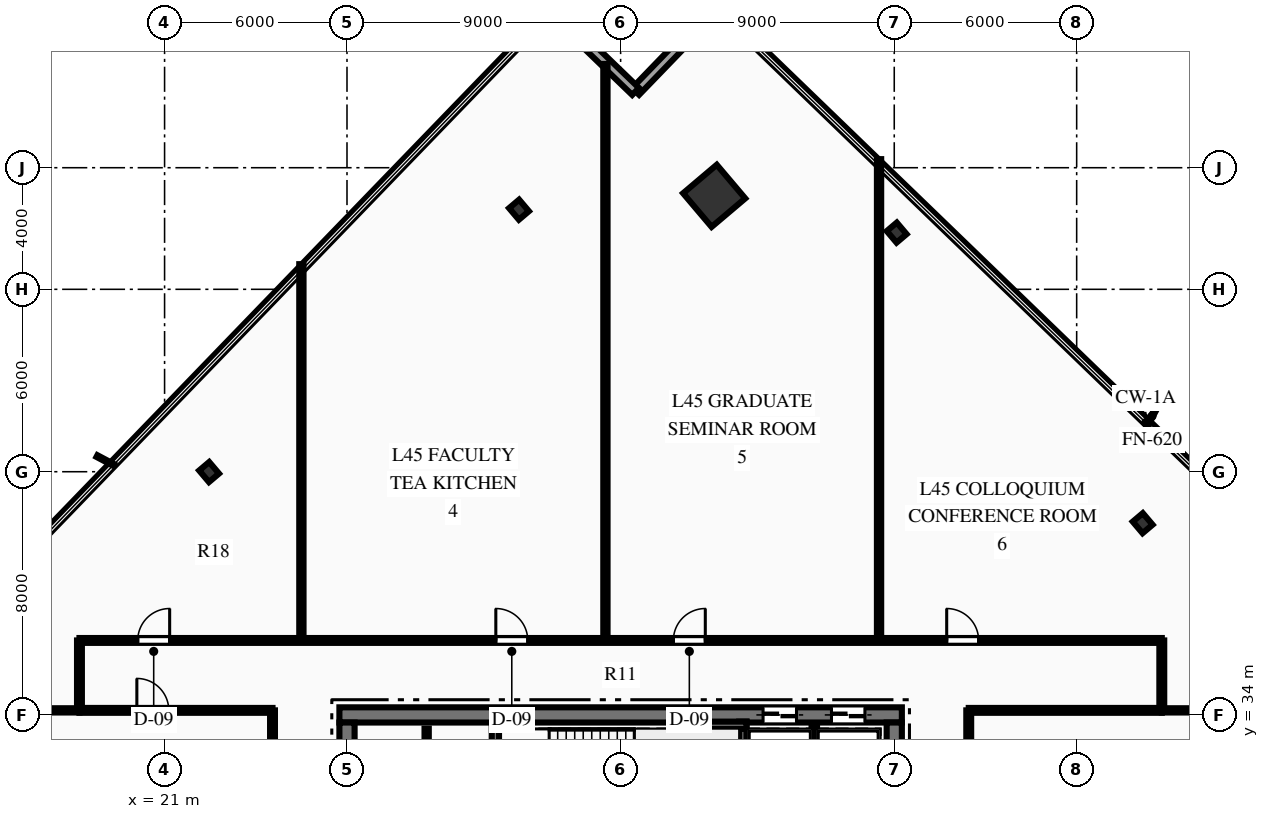
"""IFC4 building model, lengths in metres.
Left out: names, types, materials, properties, quantities, classifications, styles, units other than length and angle.
Written with IfcOpenShell. Run it as: python <this file> out.ifc"""

import sys

from ifc_helpers import new_model, si_unit, direction, frame, frame_2d, origin, origin_2d, place, context, subcontext, project, spatial, rectangle, hollow_rectangle, i_section, extrude, element, fill, save


model = new_model("IFC4")
c1 = context("Model", 3, precision=1e-05, world=origin(), true_north=direction((0.0, 1.0)))
c2 = subcontext(c1, "Body", "Model", "MODEL_VIEW")
j1 = project(units=[si_unit("LENGTHUNIT", "METRE"), si_unit("PLANEANGLEUNIT", "RADIAN")], contexts=[c1])
p1 = place(None, origin())
s1 = spatial("IfcSite", under=j1, at=p1, CompositionType="ELEMENT")
p2 = place(p1, origin())
s2 = spatial("IfcBuilding", under=s1, at=p2, CompositionType="ELEMENT")
p3 = place(p2, frame((0.0, 0.0, 181.95)))
s3 = spatial("IfcBuildingStorey", under=s2, at=p3, CompositionType="ELEMENT", Elevation=181.95)
p4 = place(p3, frame((26.75, 34.0, 0.0), z_axis=(0.0, 0.0, 1.0), x_axis=(1.0, 0.0, 0.0)))
e1 = element("IfcWall", 1, at=p4, inside=s3, PredefinedType="SHEAR", context=c2, shape_type="SweptSolid", body=[
    extrude(rectangle(XDim=18.5, YDim=0.5, at=frame_2d((9.25, 0.0))), origin(), (0.0, 0.0, 1.0), 3.75),
])
p5 = place(p4, frame((13.935, 0.0, 0.0)))
e2 = element("IfcOpeningElement", 2, at=p5, cuts=e1, PredefinedType="OPENING", context=c2, shape_type="SweptSolid", body=[
    extrude(rectangle(XDim=1.1, YDim=2.15, at=frame_2d((0.55, 1.075))), frame((0.0, 0.26, 0.0), z_axis=(0.0, -1.0, 0.0), x_axis=(1.0, 0.0, 0.0)), (0.0, 0.0, 1.0), 0.52),
])
p6 = place(p4, frame((16.185, 0.0, 0.0)))
e3 = element("IfcOpeningElement", 3, at=p6, cuts=e1, PredefinedType="OPENING", context=c2, shape_type="SweptSolid", body=[
    extrude(rectangle(XDim=1.1, YDim=2.15, at=frame_2d((0.55, 1.075))), frame((0.0, 0.26, 0.0), z_axis=(0.0, -1.0, 0.0), x_axis=(1.0, 0.0, 0.0)), (0.0, 0.0, 1.0), 0.52),
])
p7 = place(p3, frame((27.0, 18.25, 0.0), z_axis=(0.0, 0.0, 1.0), x_axis=(0.0, 1.0, 0.0)))
e4 = element("IfcWall", 4, at=p7, inside=s3, PredefinedType="SHEAR", context=c2, shape_type="SweptSolid", body=[
    extrude(rectangle(XDim=15.5, YDim=0.5, at=frame_2d((7.75, 0.0))), origin(), (0.0, 0.0, 1.0), 3.75),
])
p8 = place(p7, frame((9.99, 0.0, 0.0)))
e5 = element("IfcOpeningElement", 5, at=p8, cuts=e4, PredefinedType="OPENING", context=c2, shape_type="SweptSolid", body=[
    extrude(rectangle(XDim=1.4, YDim=2.2, at=frame_2d((0.7, 1.1))), frame((0.0, 0.26, 0.0), z_axis=(0.0, -1.0, 0.0), x_axis=(1.0, 0.0, 0.0)), (0.0, 0.0, 1.0), 0.52),
])
p9 = place(p3, frame((45.0, 18.25, 0.0), z_axis=(0.0, 0.0, 1.0), x_axis=(0.0, 1.0, 0.0)))
e6 = element("IfcWall", 6, at=p9, inside=s3, PredefinedType="SHEAR", context=c2, shape_type="SweptSolid", body=[
    extrude(rectangle(XDim=15.5, YDim=0.5, at=frame_2d((7.75, 0.0))), origin(), (0.0, 0.0, 1.0), 3.75),
])
p10 = place(p9, frame((9.99, 0.0, 0.0)))
e7 = element("IfcOpeningElement", 7, at=p10, cuts=e6, PredefinedType="OPENING", context=c2, shape_type="SweptSolid", body=[
    extrude(rectangle(XDim=1.4, YDim=2.2, at=frame_2d((0.7, 1.1))), frame((0.0, 0.26, 0.0), z_axis=(0.0, -1.0, 0.0), x_axis=(1.0, 0.0, 0.0)), (0.0, 0.0, 1.0), 0.52),
])
p11 = place(p3, frame((31.88, 29.93, 0.0), z_axis=(0.0, 0.0, 1.0), x_axis=(0.0, 1.0, 0.0)))
e8 = element("IfcWall", 8, at=p11, inside=s3, PredefinedType="SHEAR", context=c2, shape_type="SweptSolid", body=[
    extrude(rectangle(XDim=3.79, YDim=0.24, at=frame_2d((1.895, 0.0))), origin(), (0.0, 0.0, 1.0), 3.75),
])
p12 = place(p3, frame((40.02, 29.93, 0.0), z_axis=(0.0, 0.0, 1.0), x_axis=(0.0, 1.0, 0.0)))
e9 = element("IfcWall", 9, at=p12, inside=s3, PredefinedType="SHEAR", context=c2, shape_type="SweptSolid", body=[
    extrude(rectangle(XDim=3.85, YDim=0.24, at=frame_2d((1.925, 0.0))), origin(), (0.0, 0.0, 1.0), 3.75),
])
p13 = place(p3, frame((37.85, 33.66, 0.0), z_axis=(0.0, 0.0, 1.0), x_axis=(1.0, 0.0, 0.0)))
e10 = element("IfcWall", 10, at=p13, inside=s3, PredefinedType="SHEAR", context=c2, shape_type="SweptSolid", body=[
    extrude(rectangle(XDim=2.29, YDim=0.24, at=frame_2d((1.145, 0.0))), origin(), (0.0, 0.0, 1.0), 3.75),
])
p14 = place(p3, frame((39.077, 51.075, 0.0), z_axis=(0.0, 0.0, 1.0), x_axis=(0.763232469783, 0.646123979643, 0.0)))
e11 = element("IfcColumn", 11, at=p14, inside=s3, PredefinedType="COLUMN", context=c2, shape_type="SweptSolid", body=[
    extrude(hollow_rectangle(XDim=1.45, YDim=1.45, WallThickness=0.07, at=origin_2d()), origin(), (0.0, 0.0, 1.0), 3.75),
])
for number, where, z_axis, x_axis in (
    (12, (53.171, 40.307, 0.0), (0.0, 0.0, 1.0), (0.763, 0.646, 0.0)),
    (13, (45.08, 49.865, 0.0), (0.0, 0.0, 1.0), (0.763, 0.646, 0.0)),
    (14, (32.657, 50.619, 0.0), (0.0, 0.0, 1.0), (0.763, 0.646, 0.0)),
    (15, (22.464, 41.99, 0.0), (0.0, 0.0, 1.0), (0.763, 0.646, 0.0)),
):
    element("IfcColumn", number, at=place(p3, frame(where, z_axis=z_axis, x_axis=x_axis)), inside=s3, PredefinedType="COLUMN", context=c2, shape_type="SweptSolid", body=[
        extrude(i_section(OverallWidth=0.432, OverallDepth=0.498, WebThickness=0.056, FlangeThickness=0.089, at=origin_2d()), origin(), (0.0, 0.0, 1.0), 3.75),
    ])
p15 = place(p3, frame((36.492, 54.509, 0.0), z_axis=(0.0, 0.0, 1.0), x_axis=(0.694639171191, 0.719358340361, 0.0)))
e16 = element("IfcWall", 16, at=p15, inside=s3, PredefinedType="STANDARD", context=c2, shape_type="SweptSolid", body=[
    extrude(rectangle(XDim=4.0, YDim=0.32, at=frame_2d((2.0, 0.0))), origin(), (0.0, 0.0, 1.0), 3.46),
])
p16 = place(p3, frame((33.615, 57.288, 0.0), z_axis=(0.0, 0.0, 1.0), x_axis=(0.719327842116, -0.694670753348, 0.0)))
e17 = element("IfcWall", 17, at=p16, inside=s3, PredefinedType="STANDARD", context=c2, shape_type="SweptSolid", body=[
    extrude(rectangle(XDim=4.0, YDim=0.32, at=frame_2d((2.0, 0.0))), origin(), (0.0, 0.0, 1.0), 3.46),
])
p17 = place(p3, frame((29.62, 29.95, 0.0), z_axis=(0.0, 0.0, 1.0), x_axis=(0.0, 1.0, 0.0)))
e18 = element("IfcWall", 18, at=p17, inside=s3, PredefinedType="PARTITIONING", context=c2, shape_type="SweptSolid", body=[
    extrude(rectangle(XDim=3.6, YDim=0.14, at=frame_2d((1.8, 0.0))), origin(), (0.0, 0.0, 1.0), 3.46),
])
p18 = place(p3, frame((42.37, 29.9, 0.0), z_axis=(0.0, 0.0, 1.0), x_axis=(0.0, 1.0, 0.0)))
e19 = element("IfcWall", 19, at=p18, inside=s3, PredefinedType="PARTITIONING", context=c2, shape_type="SweptSolid", body=[
    extrude(rectangle(XDim=3.75, YDim=0.18, at=frame_2d((1.875, 0.0))), origin(), (0.0, 0.0, 1.0), 3.46),
])
p19 = place(p3, frame((18.2, 36.45, 0.0), z_axis=(0.0, 0.0, 1.0), x_axis=(1.0, 0.0, 0.0)))
e20 = element("IfcWall", 20, at=p19, inside=s3, PredefinedType="PARTITIONING", context=c2, shape_type="SweptSolid", body=[
    extrude(rectangle(XDim=35.6, YDim=0.16, at=frame_2d((17.8, 0.0))), origin(), (0.0, 0.0, 1.0), 3.46),
])
p20 = place(p19, frame((1.917, 0.0, 0.0)))
e21 = element("IfcOpeningElement", 21, at=p20, cuts=e20, PredefinedType="OPENING", context=c2, shape_type="SweptSolid", body=[
    extrude(rectangle(XDim=1.05, YDim=2.15, at=frame_2d((0.525, 1.075))), frame((0.0, 0.09, 0.0), z_axis=(0.0, -1.0, 0.0), x_axis=(1.0, 0.0, 0.0)), (0.0, 0.0, 1.0), 0.18),
])
p21 = place(p19, frame((13.695, 0.0, 0.0)))
e22 = element("IfcOpeningElement", 22, at=p21, cuts=e20, PredefinedType="OPENING", context=c2, shape_type="SweptSolid", body=[
    extrude(rectangle(XDim=1.05, YDim=2.15, at=frame_2d((0.525, 1.075))), frame((0.0, 0.09, 0.0), z_axis=(0.0, -1.0, 0.0), x_axis=(1.0, 0.0, 0.0)), (0.0, 0.0, 1.0), 0.18),
])
p22 = place(p19, frame((19.535, 0.0, 0.0)))
e23 = element("IfcOpeningElement", 23, at=p22, cuts=e20, PredefinedType="OPENING", context=c2, shape_type="SweptSolid", body=[
    extrude(rectangle(XDim=1.05, YDim=2.15, at=frame_2d((0.525, 1.075))), frame((0.0, 0.09, 0.0), z_axis=(0.0, -1.0, 0.0), x_axis=(1.0, 0.0, 0.0)), (0.0, 0.0, 1.0), 0.18),
])
p23 = place(p19, frame((28.525, 0.0, 0.0)))
e24 = element("IfcOpeningElement", 24, at=p23, cuts=e20, PredefinedType="OPENING", context=c2, shape_type="SweptSolid", body=[
    extrude(rectangle(XDim=1.05, YDim=2.15, at=frame_2d((0.525, 1.075))), frame((0.0, 0.09, 0.0), z_axis=(0.0, -1.0, 0.0), x_axis=(1.0, 0.0, 0.0)), (0.0, 0.0, 1.0), 0.18),
])
p24 = place(p3, frame((18.2, 34.15, 0.0), z_axis=(0.0, 0.0, 1.0), x_axis=(1.0, 0.0, 0.0)))
e25 = element("IfcWall", 25, at=p24, inside=s3, PredefinedType="PARTITIONING", context=c2, shape_type="SweptSolid", body=[
    extrude(rectangle(XDim=6.35, YDim=0.16, at=frame_2d((3.175, 0.0))), origin(), (0.0, 0.0, 1.0), 3.46),
])
p25 = place(p24, frame((1.888, 0.0, 0.0)))
e26 = element("IfcOpeningElement", 26, at=p25, cuts=e25, PredefinedType="OPENING", context=c2, shape_type="SweptSolid", body=[
    extrude(rectangle(XDim=1.05, YDim=2.15, at=frame_2d((0.525, 1.075))), frame((0.0, 0.09, 0.0), z_axis=(0.0, -1.0, 0.0), x_axis=(1.0, 0.0, 0.0)), (0.0, 0.0, 1.0), 0.18),
])
p26 = place(p3, frame((47.45, 34.15, 0.0), z_axis=(0.0, 0.0, 1.0), x_axis=(1.0, 0.0, 0.0)))
e27 = element("IfcWall", 27, at=p26, inside=s3, PredefinedType="PARTITIONING", context=c2, shape_type="SweptSolid", body=[
    extrude(rectangle(XDim=6.35, YDim=0.16, at=frame_2d((3.175, 0.0))), origin(), (0.0, 0.0, 1.0), 3.46),
])
p27 = place(p3, frame((24.55, 17.85, 0.0), z_axis=(0.0, 0.0, 1.0), x_axis=(0.0, 1.0, 0.0)))
e28 = element("IfcWall", 28, at=p27, inside=s3, PredefinedType="PARTITIONING", context=c2, shape_type="SweptSolid", body=[
    extrude(rectangle(XDim=16.3, YDim=0.16, at=frame_2d((8.15, 0.0))), origin(), (0.0, 0.0, 1.0), 3.46),
])
p28 = place(p27, frame((5.741, 0.0, 0.0)))
e29 = element("IfcOpeningElement", 29, at=p28, cuts=e28, PredefinedType="OPENING", context=c2, shape_type="SweptSolid", body=[
    extrude(rectangle(XDim=1.05, YDim=2.15, at=frame_2d((0.525, 1.075))), frame((0.0, 0.09, 0.0), z_axis=(0.0, -1.0, 0.0), x_axis=(1.0, 0.0, 0.0)), (0.0, 0.0, 1.0), 0.18),
])
p29 = place(p27, frame((8.605, 0.0, 0.0)))
e30 = element("IfcOpeningElement", 30, at=p29, cuts=e28, PredefinedType="OPENING", context=c2, shape_type="SweptSolid", body=[
    extrude(rectangle(XDim=1.05, YDim=2.15, at=frame_2d((0.525, 1.075))), frame((0.0, 0.09, 0.0), z_axis=(0.0, -1.0, 0.0), x_axis=(1.0, 0.0, 0.0)), (0.0, 0.0, 1.0), 0.18),
])
p30 = place(p3, frame((47.45, 27.25, 0.0), z_axis=(0.0, 0.0, 1.0), x_axis=(0.0, 1.0, 0.0)))
e31 = element("IfcWall", 31, at=p30, inside=s3, PredefinedType="PARTITIONING", context=c2, shape_type="SweptSolid", body=[
    extrude(rectangle(XDim=6.9, YDim=0.16, at=frame_2d((3.45, 0.0))), origin(), (0.0, 0.0, 1.0), 3.46),
])
for number, where, z_axis, x_axis in (
    (32, (18.2, 34.15, 0.0), (0.0, 0.0, 1.0), (0.0, 1.0, 0.0)),
    (33, (53.8, 34.15, 0.0), (0.0, 0.0, 1.0), (0.0, 1.0, 0.0)),
):
    element("IfcWall", number, at=place(p3, frame(where, z_axis=z_axis, x_axis=x_axis)), inside=s3, PredefinedType="PARTITIONING", context=c2, shape_type="SweptSolid", body=[
        extrude(rectangle(XDim=2.3, YDim=0.16, at=frame_2d((1.15, 0.0))), origin(), (0.0, 0.0, 1.0), 3.46),
    ])
p31 = place(p3, frame((11.327, 34.15, 0.0), z_axis=(0.0, 0.0, 1.0), x_axis=(1.0, 0.0, 0.0)))
e34 = element("IfcWall", 34, at=p31, inside=s3, PredefinedType="PARTITIONING", context=c2, shape_type="SweptSolid", body=[
    extrude(rectangle(XDim=6.873, YDim=0.14, at=frame_2d((3.437, 0.0))), origin(), (0.0, 0.0, 1.0), 3.46),
])
p32 = place(p3, frame((53.8, 34.15, 0.0), z_axis=(0.0, 0.0, 1.0), x_axis=(1.0, 0.0, 0.0)))
e35 = element("IfcWall", 35, at=p32, inside=s3, PredefinedType="PARTITIONING", context=c2, shape_type="SweptSolid", body=[
    extrude(rectangle(XDim=9.476, YDim=0.14, at=frame_2d((4.738, 0.0))), origin(), (0.0, 0.0, 1.0), 3.46),
])
p33 = place(p3, frame((25.5, 36.45, 0.0), z_axis=(0.0, 0.0, 1.0), x_axis=(0.0, 1.0, 0.0)))
e36 = element("IfcWall", 36, at=p33, inside=s3, PredefinedType="PARTITIONING", context=c2, shape_type="SweptSolid", body=[
    extrude(rectangle(XDim=12.377, YDim=0.14, at=frame_2d((6.188, 0.0))), origin(), (0.0, 0.0, 1.0), 3.46),
])
p34 = place(p3, frame((35.5, 36.45, 0.0), z_axis=(0.0, 0.0, 1.0), x_axis=(0.0, 1.0, 0.0)))
e37 = element("IfcWall", 37, at=p34, inside=s3, PredefinedType="PARTITIONING", context=c2, shape_type="SweptSolid", body=[
    extrude(rectangle(XDim=18.962, YDim=0.14, at=frame_2d((9.481, 0.0))), origin(), (0.0, 0.0, 1.0), 3.46),
])
p35 = place(p3, frame((44.5, 36.45, 0.0), z_axis=(0.0, 0.0, 1.0), x_axis=(0.0, 1.0, 0.0)))
e38 = element("IfcWall", 38, at=p35, inside=s3, PredefinedType="PARTITIONING", context=c2, shape_type="SweptSolid", body=[
    extrude(rectangle(XDim=15.832, YDim=0.14, at=frame_2d((7.916, 0.0))), origin(), (0.0, 0.0, 1.0), 3.46),
])
p36 = place(p20, origin())
e39 = element("IfcDoor", 39, at=p36, inside=s3, OperationType="SINGLE_SWING_RIGHT", PredefinedType="DOOR", context=c2, shape_type="SweptSolid", body=[
    extrude(rectangle(XDim=1.05, YDim=2.15, at=frame_2d((0.525, 1.075))), frame((0.0, 0.025, 0.0), z_axis=(0.0, -1.0, 0.0), x_axis=(1.0, 0.0, 0.0)), (0.0, 0.0, 1.0), 0.05),
])
fill(e21, e39)
p37 = place(p21, origin())
e40 = element("IfcDoor", 40, at=p37, inside=s3, OperationType="SINGLE_SWING_LEFT", PredefinedType="DOOR", context=c2, shape_type="SweptSolid", body=[
    extrude(rectangle(XDim=1.05, YDim=2.15, at=frame_2d((0.525, 1.075))), frame((0.0, 0.025, 0.0), z_axis=(0.0, -1.0, 0.0), x_axis=(1.0, 0.0, 0.0)), (0.0, 0.0, 1.0), 0.05),
])
fill(e22, e40)
p38 = place(p22, origin())
e41 = element("IfcDoor", 41, at=p38, inside=s3, OperationType="SINGLE_SWING_RIGHT", PredefinedType="DOOR", context=c2, shape_type="SweptSolid", body=[
    extrude(rectangle(XDim=1.05, YDim=2.15, at=frame_2d((0.525, 1.075))), frame((0.0, 0.025, 0.0), z_axis=(0.0, -1.0, 0.0), x_axis=(1.0, 0.0, 0.0)), (0.0, 0.0, 1.0), 0.05),
])
fill(e23, e41)
p39 = place(p23, origin())
e42 = element("IfcDoor", 42, at=p39, inside=s3, OperationType="SINGLE_SWING_LEFT", PredefinedType="DOOR", context=c2, shape_type="SweptSolid", body=[
    extrude(rectangle(XDim=1.05, YDim=2.15, at=frame_2d((0.525, 1.075))), frame((0.0, 0.025, 0.0), z_axis=(0.0, -1.0, 0.0), x_axis=(1.0, 0.0, 0.0)), (0.0, 0.0, 1.0), 0.05),
])
fill(e24, e42)
p40 = place(p25, origin())
e43 = element("IfcDoor", 43, at=p40, inside=s3, OperationType="SINGLE_SWING_LEFT", PredefinedType="DOOR", context=c2, shape_type="SweptSolid", body=[
    extrude(rectangle(XDim=1.05, YDim=2.15, at=frame_2d((0.525, 1.075))), frame((0.0, 0.025, 0.0), z_axis=(0.0, -1.0, 0.0), x_axis=(1.0, 0.0, 0.0)), (0.0, 0.0, 1.0), 0.05),
])
fill(e26, e43)
p41 = place(p5, origin())
e44 = element("IfcDoor", 44, at=p41, inside=s3, OperationType="SLIDING_TO_LEFT", PredefinedType="DOOR", context=c2, shape_type="SweptSolid", body=[
    extrude(rectangle(XDim=1.1, YDim=2.15, at=frame_2d((0.55, 1.075))), frame((0.0, 0.025, 0.0), z_axis=(0.0, -1.0, 0.0), x_axis=(1.0, 0.0, 0.0)), (0.0, 0.0, 1.0), 0.05),
])
fill(e2, e44)
p42 = place(p6, origin())
e45 = element("IfcDoor", 45, at=p42, inside=s3, OperationType="SLIDING_TO_LEFT", PredefinedType="DOOR", context=c2, shape_type="SweptSolid", body=[
    extrude(rectangle(XDim=1.1, YDim=2.15, at=frame_2d((0.55, 1.075))), frame((0.0, 0.025, 0.0), z_axis=(0.0, -1.0, 0.0), x_axis=(1.0, 0.0, 0.0)), (0.0, 0.0, 1.0), 0.05),
])
fill(e3, e45)
save(model, sys.argv[1])
